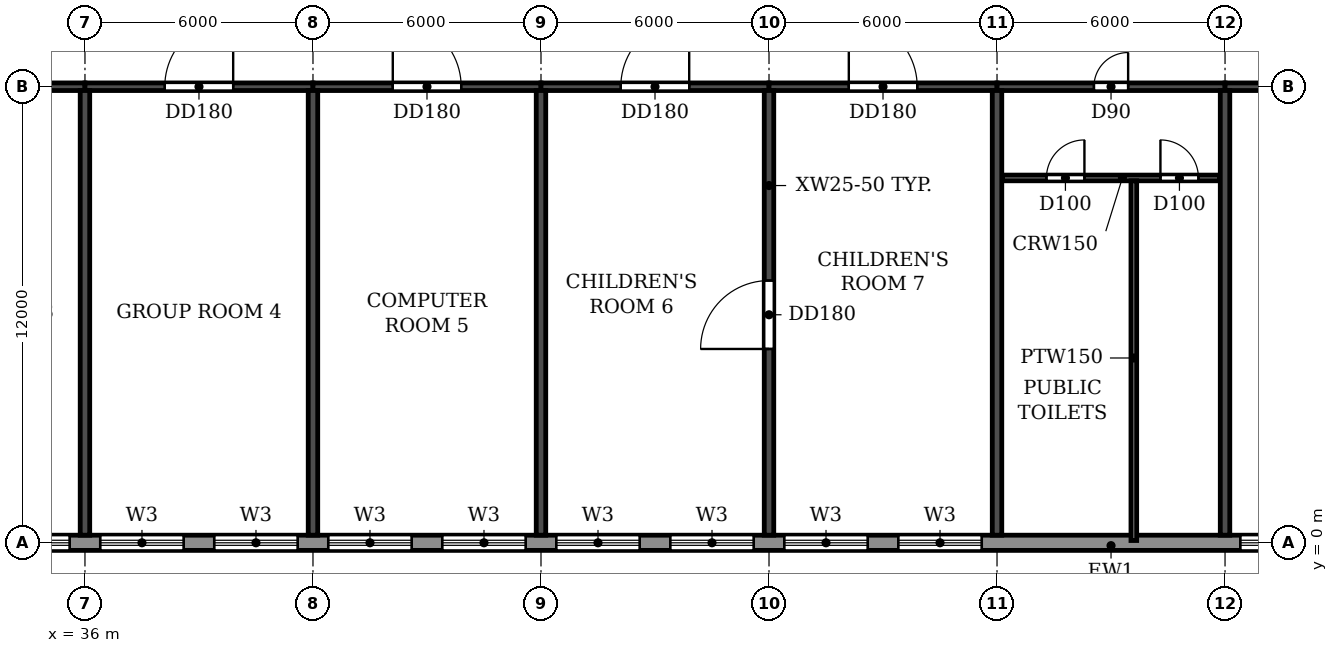
"""IFC4 building model, lengths in metres.
Left out: names, types, materials, properties, quantities, classifications, styles, units other than length and angle.
Written with IfcOpenShell. Run it as: python <this file> out.ifc"""

import sys

from ifc_helpers import new_model, si_unit, direction, frame, frame_2d, origin, place, context, subcontext, project, spatial, rectangle, extrude, element, fill, save


model = new_model("IFC4")
c1 = context("Model", 3, precision=1e-05, world=origin(), true_north=direction((0.0, 1.0)))
c2 = subcontext(c1, "Body", "Model", "MODEL_VIEW")
j1 = project(units=[si_unit("LENGTHUNIT", "METRE"), si_unit("PLANEANGLEUNIT", "RADIAN")], contexts=[c1])
p1 = place(None, origin())
s1 = spatial("IfcSite", under=j1, at=p1, CompositionType="ELEMENT")
p2 = place(p1, origin())
s2 = spatial("IfcBuilding", under=s1, at=p2, CompositionType="ELEMENT")
p3 = place(p2, frame((0.0, 0.0, 211.5)))
s3 = spatial("IfcBuildingStorey", under=s2, at=p3, CompositionType="ELEMENT", Elevation=211.5)
for number, where, z_axis, x_axis in (
    (1, (36.0, 0.2, 0.0), (0.0, 0.0, 1.0), (0.0, 1.0, 0.0)),
    (2, (42.0, 0.2, 0.0), (0.0, 0.0, 1.0), (0.0, 1.0, 0.0)),
    (3, (48.0, 0.2, 0.0), (0.0, 0.0, 1.0), (0.0, 1.0, 0.0)),
):
    element("IfcWall", number, at=place(p3, frame(where, z_axis=z_axis, x_axis=x_axis)), inside=s3, PredefinedType="SHEAR", context=c2, shape_type="SweptSolid", body=[
        extrude(rectangle(XDim=11.7, YDim=0.25, at=frame_2d((5.85, 0.0))), origin(), (0.0, 0.0, 1.0), 2.95),
    ])
p4 = place(p3, frame((54.0, 0.2, 0.0), z_axis=(0.0, 0.0, 1.0), x_axis=(0.0, 1.0, 0.0)))
e4 = element("IfcWall", 4, at=p4, inside=s3, PredefinedType="SHEAR", context=c2, shape_type="SweptSolid", body=[
    extrude(rectangle(XDim=11.7, YDim=0.25, at=frame_2d((5.85, 0.0))), origin(), (0.0, 0.0, 1.0), 2.95),
])
p5 = place(p4, frame((4.9, 0.0, 0.0)))
e5 = element("IfcOpeningElement", 5, at=p5, cuts=e4, PredefinedType="OPENING", context=c2, shape_type="SweptSolid", body=[
    extrude(rectangle(XDim=1.8, YDim=2.1, at=frame_2d((0.9, 1.05))), frame((0.0, 0.135, 0.0), z_axis=(0.0, -1.0, 0.0), x_axis=(1.0, 0.0, 0.0)), (0.0, 0.0, 1.0), 0.27),
])
for number, where, z_axis, x_axis in (
    (6, (60.0, 0.2, 0.0), (0.0, 0.0, 1.0), (0.0, 1.0, 0.0)),
    (7, (66.0, 0.2, 0.0), (0.0, 0.0, 1.0), (0.0, 1.0, 0.0)),
):
    element("IfcWall", number, at=place(p3, frame(where, z_axis=z_axis, x_axis=x_axis)), inside=s3, PredefinedType="SHEAR", context=c2, shape_type="SweptSolid", body=[
        extrude(rectangle(XDim=11.7, YDim=0.25, at=frame_2d((5.85, 0.0))), origin(), (0.0, 0.0, 1.0), 2.95),
    ])
p6 = place(p3, frame((30.0, 12.0, 0.0), z_axis=(0.0, 0.0, 1.0), x_axis=(1.0, 0.0, 0.0)))
e8 = element("IfcWall", 8, at=p6, inside=s3, PredefinedType="SHEAR", context=c2, shape_type="SweptSolid", body=[
    extrude(rectangle(XDim=6.0, YDim=0.2, at=frame_2d((3.0, 0.0))), origin(), (0.0, 0.0, 1.0), 2.35),
])
p7 = place(p6, frame((2.1, 0.0, 0.0)))
e9 = element("IfcOpeningElement", 9, at=p7, cuts=e8, PredefinedType="OPENING", context=c2, shape_type="SweptSolid", body=[
    extrude(rectangle(XDim=1.8, YDim=2.1, at=frame_2d((0.9, 1.05))), frame((0.0, 0.11, 0.0), z_axis=(0.0, -1.0, 0.0), x_axis=(1.0, 0.0, 0.0)), (0.0, 0.0, 1.0), 0.22),
])
p8 = place(p3, frame((36.0, 12.0, 0.0), z_axis=(0.0, 0.0, 1.0), x_axis=(1.0, 0.0, 0.0)))
e10 = element("IfcWall", 10, at=p8, inside=s3, PredefinedType="SHEAR", context=c2, shape_type="SweptSolid", body=[
    extrude(rectangle(XDim=6.0, YDim=0.2, at=frame_2d((3.0, 0.0))), origin(), (0.0, 0.0, 1.0), 2.35),
])
p9 = place(p8, frame((2.1, 0.0, 0.0)))
e11 = element("IfcOpeningElement", 11, at=p9, cuts=e10, PredefinedType="OPENING", context=c2, shape_type="SweptSolid", body=[
    extrude(rectangle(XDim=1.8, YDim=2.1, at=frame_2d((0.9, 1.05))), frame((0.0, 0.11, 0.0), z_axis=(0.0, -1.0, 0.0), x_axis=(1.0, 0.0, 0.0)), (0.0, 0.0, 1.0), 0.22),
])
p10 = place(p3, frame((42.0, 12.0, 0.0), z_axis=(0.0, 0.0, 1.0), x_axis=(1.0, 0.0, 0.0)))
e12 = element("IfcWall", 12, at=p10, inside=s3, PredefinedType="SHEAR", context=c2, shape_type="SweptSolid", body=[
    extrude(rectangle(XDim=6.0, YDim=0.2, at=frame_2d((3.0, 0.0))), origin(), (0.0, 0.0, 1.0), 2.35),
])
p11 = place(p10, frame((2.1, 0.0, 0.0)))
e13 = element("IfcOpeningElement", 13, at=p11, cuts=e12, PredefinedType="OPENING", context=c2, shape_type="SweptSolid", body=[
    extrude(rectangle(XDim=1.8, YDim=2.1, at=frame_2d((0.9, 1.05))), frame((0.0, 0.11, 0.0), z_axis=(0.0, -1.0, 0.0), x_axis=(1.0, 0.0, 0.0)), (0.0, 0.0, 1.0), 0.22),
])
p12 = place(p3, frame((48.0, 12.0, 0.0), z_axis=(0.0, 0.0, 1.0), x_axis=(1.0, 0.0, 0.0)))
e14 = element("IfcWall", 14, at=p12, inside=s3, PredefinedType="SHEAR", context=c2, shape_type="SweptSolid", body=[
    extrude(rectangle(XDim=6.0, YDim=0.2, at=frame_2d((3.0, 0.0))), origin(), (0.0, 0.0, 1.0), 2.35),
])
p13 = place(p12, frame((2.1, 0.0, 0.0)))
e15 = element("IfcOpeningElement", 15, at=p13, cuts=e14, PredefinedType="OPENING", context=c2, shape_type="SweptSolid", body=[
    extrude(rectangle(XDim=1.8, YDim=2.1, at=frame_2d((0.9, 1.05))), frame((0.0, 0.11, 0.0), z_axis=(0.0, -1.0, 0.0), x_axis=(1.0, 0.0, 0.0)), (0.0, 0.0, 1.0), 0.22),
])
p14 = place(p3, frame((54.0, 12.0, 0.0), z_axis=(0.0, 0.0, 1.0), x_axis=(1.0, 0.0, 0.0)))
e16 = element("IfcWall", 16, at=p14, inside=s3, PredefinedType="SHEAR", context=c2, shape_type="SweptSolid", body=[
    extrude(rectangle(XDim=6.0, YDim=0.2, at=frame_2d((3.0, 0.0))), origin(), (0.0, 0.0, 1.0), 2.35),
])
p15 = place(p14, frame((2.1, 0.0, 0.0)))
e17 = element("IfcOpeningElement", 17, at=p15, cuts=e16, PredefinedType="OPENING", context=c2, shape_type="SweptSolid", body=[
    extrude(rectangle(XDim=1.8, YDim=2.1, at=frame_2d((0.9, 1.05))), frame((0.0, 0.11, 0.0), z_axis=(0.0, -1.0, 0.0), x_axis=(1.0, 0.0, 0.0)), (0.0, 0.0, 1.0), 0.22),
])
p16 = place(p3, frame((60.0, 12.0, 0.0), z_axis=(0.0, 0.0, 1.0), x_axis=(1.0, 0.0, 0.0)))
e18 = element("IfcWall", 18, at=p16, inside=s3, PredefinedType="SHEAR", context=c2, shape_type="SweptSolid", body=[
    extrude(rectangle(XDim=6.0, YDim=0.2, at=frame_2d((3.0, 0.0))), origin(), (0.0, 0.0, 1.0), 2.35),
])
p17 = place(p16, frame((2.55, 0.0, 0.0)))
e19 = element("IfcOpeningElement", 19, at=p17, cuts=e18, PredefinedType="OPENING", context=c2, shape_type="SweptSolid", body=[
    extrude(rectangle(XDim=0.9, YDim=2.1, at=frame_2d((0.45, 1.05))), frame((0.0, 0.11, 0.0), z_axis=(0.0, -1.0, 0.0), x_axis=(1.0, 0.0, 0.0)), (0.0, 0.0, 1.0), 0.22),
])
p18 = place(p3, frame((66.0, 12.0, 0.0), z_axis=(0.0, 0.0, 1.0), x_axis=(1.0, 0.0, 0.0)))
e20 = element("IfcWall", 20, at=p18, inside=s3, PredefinedType="SHEAR", context=c2, shape_type="SweptSolid", body=[
    extrude(rectangle(XDim=6.0, YDim=0.2, at=frame_2d((3.0, 0.0))), origin(), (0.0, 0.0, 1.0), 2.35),
])
p19 = place(p18, frame((2.1, 0.0, 0.0)))
e21 = element("IfcOpeningElement", 21, at=p19, cuts=e20, PredefinedType="OPENING", context=c2, shape_type="SweptSolid", body=[
    extrude(rectangle(XDim=1.8, YDim=2.1, at=frame_2d((0.9, 1.05))), frame((0.0, 0.11, 0.0), z_axis=(0.0, -1.0, 0.0), x_axis=(1.0, 0.0, 0.0)), (0.0, 0.0, 1.0), 0.22),
])
p20 = place(p3, frame((22.683, 0.0, 0.0), z_axis=(0.0, 0.0, 1.0), x_axis=(1.0, 0.0, 0.0)))
e22 = element("IfcWall", 22, at=p20, inside=s3, PredefinedType="STANDARD", context=c2, shape_type="SweptSolid", body=[
    extrude(rectangle(XDim=56.634, YDim=0.4, at=frame_2d((28.317, 0.0))), origin(), (0.0, 0.0, 1.0), 2.95),
])
p21 = place(p20, frame((1.717, 0.0, 0.6)))
e23 = element("IfcOpeningElement", 23, at=p21, cuts=e22, PredefinedType="OPENING", context=c2, shape_type="SweptSolid", body=[
    extrude(rectangle(XDim=2.2, YDim=1.8, at=frame_2d((1.1, 0.9))), frame((0.0, 0.21, 0.0), z_axis=(0.0, -1.0, 0.0), x_axis=(1.0, 0.0, 0.0)), (0.0, 0.0, 1.0), 0.42),
])
p22 = place(p20, frame((4.717, 0.0, 0.6)))
e24 = element("IfcOpeningElement", 24, at=p22, cuts=e22, PredefinedType="OPENING", context=c2, shape_type="SweptSolid", body=[
    extrude(rectangle(XDim=2.2, YDim=1.8, at=frame_2d((1.1, 0.9))), frame((0.0, 0.21, 0.0), z_axis=(0.0, -1.0, 0.0), x_axis=(1.0, 0.0, 0.0)), (0.0, 0.0, 1.0), 0.42),
])
p23 = place(p20, frame((7.717, 0.0, 0.6)))
e25 = element("IfcOpeningElement", 25, at=p23, cuts=e22, PredefinedType="OPENING", context=c2, shape_type="SweptSolid", body=[
    extrude(rectangle(XDim=2.2, YDim=1.8, at=frame_2d((1.1, 0.9))), frame((0.0, 0.21, 0.0), z_axis=(0.0, -1.0, 0.0), x_axis=(1.0, 0.0, 0.0)), (0.0, 0.0, 1.0), 0.42),
])
p24 = place(p20, frame((10.717, 0.0, 0.6)))
e26 = element("IfcOpeningElement", 26, at=p24, cuts=e22, PredefinedType="OPENING", context=c2, shape_type="SweptSolid", body=[
    extrude(rectangle(XDim=2.2, YDim=1.8, at=frame_2d((1.1, 0.9))), frame((0.0, 0.21, 0.0), z_axis=(0.0, -1.0, 0.0), x_axis=(1.0, 0.0, 0.0)), (0.0, 0.0, 1.0), 0.42),
])
p25 = place(p20, frame((13.717, 0.0, 0.6)))
e27 = element("IfcOpeningElement", 27, at=p25, cuts=e22, PredefinedType="OPENING", context=c2, shape_type="SweptSolid", body=[
    extrude(rectangle(XDim=2.2, YDim=1.8, at=frame_2d((1.1, 0.9))), frame((0.0, 0.21, 0.0), z_axis=(0.0, -1.0, 0.0), x_axis=(1.0, 0.0, 0.0)), (0.0, 0.0, 1.0), 0.42),
])
p26 = place(p20, frame((16.717, 0.0, 0.6)))
e28 = element("IfcOpeningElement", 28, at=p26, cuts=e22, PredefinedType="OPENING", context=c2, shape_type="SweptSolid", body=[
    extrude(rectangle(XDim=2.2, YDim=1.8, at=frame_2d((1.1, 0.9))), frame((0.0, 0.21, 0.0), z_axis=(0.0, -1.0, 0.0), x_axis=(1.0, 0.0, 0.0)), (0.0, 0.0, 1.0), 0.42),
])
p27 = place(p20, frame((19.717, 0.0, 0.6)))
e29 = element("IfcOpeningElement", 29, at=p27, cuts=e22, PredefinedType="OPENING", context=c2, shape_type="SweptSolid", body=[
    extrude(rectangle(XDim=2.2, YDim=1.8, at=frame_2d((1.1, 0.9))), frame((0.0, 0.21, 0.0), z_axis=(0.0, -1.0, 0.0), x_axis=(1.0, 0.0, 0.0)), (0.0, 0.0, 1.0), 0.42),
])
p28 = place(p20, frame((22.717, 0.0, 0.6)))
e30 = element("IfcOpeningElement", 30, at=p28, cuts=e22, PredefinedType="OPENING", context=c2, shape_type="SweptSolid", body=[
    extrude(rectangle(XDim=2.2, YDim=1.8, at=frame_2d((1.1, 0.9))), frame((0.0, 0.21, 0.0), z_axis=(0.0, -1.0, 0.0), x_axis=(1.0, 0.0, 0.0)), (0.0, 0.0, 1.0), 0.42),
])
p29 = place(p20, frame((25.717, 0.0, 0.6)))
e31 = element("IfcOpeningElement", 31, at=p29, cuts=e22, PredefinedType="OPENING", context=c2, shape_type="SweptSolid", body=[
    extrude(rectangle(XDim=2.2, YDim=1.8, at=frame_2d((1.1, 0.9))), frame((0.0, 0.21, 0.0), z_axis=(0.0, -1.0, 0.0), x_axis=(1.0, 0.0, 0.0)), (0.0, 0.0, 1.0), 0.42),
])
p30 = place(p20, frame((28.717, 0.0, 0.6)))
e32 = element("IfcOpeningElement", 32, at=p30, cuts=e22, PredefinedType="OPENING", context=c2, shape_type="SweptSolid", body=[
    extrude(rectangle(XDim=2.2, YDim=1.8, at=frame_2d((1.1, 0.9))), frame((0.0, 0.21, 0.0), z_axis=(0.0, -1.0, 0.0), x_axis=(1.0, 0.0, 0.0)), (0.0, 0.0, 1.0), 0.42),
])
p31 = place(p20, frame((31.717, 0.0, 0.6)))
e33 = element("IfcOpeningElement", 33, at=p31, cuts=e22, PredefinedType="OPENING", context=c2, shape_type="SweptSolid", body=[
    extrude(rectangle(XDim=2.2, YDim=1.8, at=frame_2d((1.1, 0.9))), frame((0.0, 0.21, 0.0), z_axis=(0.0, -1.0, 0.0), x_axis=(1.0, 0.0, 0.0)), (0.0, 0.0, 1.0), 0.42),
])
p32 = place(p20, frame((34.717, 0.0, 0.6)))
e34 = element("IfcOpeningElement", 34, at=p32, cuts=e22, PredefinedType="OPENING", context=c2, shape_type="SweptSolid", body=[
    extrude(rectangle(XDim=2.2, YDim=1.8, at=frame_2d((1.1, 0.9))), frame((0.0, 0.21, 0.0), z_axis=(0.0, -1.0, 0.0), x_axis=(1.0, 0.0, 0.0)), (0.0, 0.0, 1.0), 0.42),
])
p33 = place(p20, frame((43.717, 0.0, 0.6)))
e35 = element("IfcOpeningElement", 35, at=p33, cuts=e22, PredefinedType="OPENING", context=c2, shape_type="SweptSolid", body=[
    extrude(rectangle(XDim=2.2, YDim=1.8, at=frame_2d((1.1, 0.9))), frame((0.0, 0.21, 0.0), z_axis=(0.0, -1.0, 0.0), x_axis=(1.0, 0.0, 0.0)), (0.0, 0.0, 1.0), 0.42),
])
p34 = place(p20, frame((46.717, 0.0, 0.6)))
e36 = element("IfcOpeningElement", 36, at=p34, cuts=e22, PredefinedType="OPENING", context=c2, shape_type="SweptSolid", body=[
    extrude(rectangle(XDim=2.2, YDim=1.8, at=frame_2d((1.1, 0.9))), frame((0.0, 0.21, 0.0), z_axis=(0.0, -1.0, 0.0), x_axis=(1.0, 0.0, 0.0)), (0.0, 0.0, 1.0), 0.42),
])
p35 = place(p20, frame((49.717, 0.0, 0.6)))
e37 = element("IfcOpeningElement", 37, at=p35, cuts=e22, PredefinedType="OPENING", context=c2, shape_type="SweptSolid", body=[
    extrude(rectangle(XDim=2.2, YDim=1.8, at=frame_2d((1.1, 0.9))), frame((0.0, 0.21, 0.0), z_axis=(0.0, -1.0, 0.0), x_axis=(1.0, 0.0, 0.0)), (0.0, 0.0, 1.0), 0.42),
])
p36 = place(p20, frame((52.717, 0.0, 0.6)))
e38 = element("IfcOpeningElement", 38, at=p36, cuts=e22, PredefinedType="OPENING", context=c2, shape_type="SweptSolid", body=[
    extrude(rectangle(XDim=2.2, YDim=1.8, at=frame_2d((1.1, 0.9))), frame((0.0, 0.21, 0.0), z_axis=(0.0, -1.0, 0.0), x_axis=(1.0, 0.0, 0.0)), (0.0, 0.0, 1.0), 0.42),
])
p37 = place(p3, frame((60.135, 9.6, 0.0), z_axis=(0.0, 0.0, 1.0), x_axis=(1.0, 0.0, 0.0)))
e39 = element("IfcWall", 39, at=p37, inside=s3, PredefinedType="PARTITIONING", context=c2, shape_type="SweptSolid", body=[
    extrude(rectangle(XDim=5.73, YDim=0.15, at=frame_2d((2.865, 0.0))), origin(), (0.0, 0.0, 1.0), 2.95),
])
p38 = place(p37, frame((1.165, 0.0, 0.0)))
e40 = element("IfcOpeningElement", 40, at=p38, cuts=e39, PredefinedType="OPENING", context=c2, shape_type="SweptSolid", body=[
    extrude(rectangle(XDim=1.0, YDim=2.1, at=frame_2d((0.5, 1.05))), frame((0.0, 0.085, 0.0), z_axis=(0.0, -1.0, 0.0), x_axis=(1.0, 0.0, 0.0)), (0.0, 0.0, 1.0), 0.17),
])
p39 = place(p37, frame((4.165, 0.0, 0.0)))
e41 = element("IfcOpeningElement", 41, at=p39, cuts=e39, PredefinedType="OPENING", context=c2, shape_type="SweptSolid", body=[
    extrude(rectangle(XDim=1.0, YDim=2.1, at=frame_2d((0.5, 1.05))), frame((0.0, 0.085, 0.0), z_axis=(0.0, -1.0, 0.0), x_axis=(1.0, 0.0, 0.0)), (0.0, 0.0, 1.0), 0.17),
])
p40 = place(p3, frame((63.6, 0.06, 0.0), z_axis=(0.0, 0.0, 1.0), x_axis=(0.0, 1.0, 0.0)))
e42 = element("IfcWall", 42, at=p40, inside=s3, PredefinedType="PARTITIONING", context=c2, shape_type="SweptSolid", body=[
    extrude(rectangle(XDim=9.465, YDim=0.15, at=frame_2d((4.732, 0.0))), origin(), (0.0, 0.0, 1.0), 2.95),
])
p41 = place(p24, origin())
e43 = element("IfcWindow", 43, at=p41, inside=s3, PartitioningType="DOUBLE_PANEL_HORIZONTAL", PredefinedType="WINDOW", context=c2, shape_type="SweptSolid", body=[
    extrude(rectangle(XDim=2.2, YDim=1.8, at=frame_2d((1.1, 0.9))), frame((0.0, 0.03, 0.0), z_axis=(0.0, -1.0, 0.0), x_axis=(1.0, 0.0, 0.0)), (0.0, 0.0, 1.0), 0.06),
])
fill(e26, e43)
p42 = place(p25, origin())
e44 = element("IfcWindow", 44, at=p42, inside=s3, PartitioningType="DOUBLE_PANEL_HORIZONTAL", PredefinedType="WINDOW", context=c2, shape_type="SweptSolid", body=[
    extrude(rectangle(XDim=2.2, YDim=1.8, at=frame_2d((1.1, 0.9))), frame((0.0, 0.03, 0.0), z_axis=(0.0, -1.0, 0.0), x_axis=(1.0, 0.0, 0.0)), (0.0, 0.0, 1.0), 0.06),
])
fill(e27, e44)
p43 = place(p26, origin())
e45 = element("IfcWindow", 45, at=p43, inside=s3, PartitioningType="DOUBLE_PANEL_HORIZONTAL", PredefinedType="WINDOW", context=c2, shape_type="SweptSolid", body=[
    extrude(rectangle(XDim=2.2, YDim=1.8, at=frame_2d((1.1, 0.9))), frame((0.0, 0.03, 0.0), z_axis=(0.0, -1.0, 0.0), x_axis=(1.0, 0.0, 0.0)), (0.0, 0.0, 1.0), 0.06),
])
fill(e28, e45)
p44 = place(p27, origin())
e46 = element("IfcWindow", 46, at=p44, inside=s3, PartitioningType="DOUBLE_PANEL_HORIZONTAL", PredefinedType="WINDOW", context=c2, shape_type="SweptSolid", body=[
    extrude(rectangle(XDim=2.2, YDim=1.8, at=frame_2d((1.1, 0.9))), frame((0.0, 0.03, 0.0), z_axis=(0.0, -1.0, 0.0), x_axis=(1.0, 0.0, 0.0)), (0.0, 0.0, 1.0), 0.06),
])
fill(e29, e46)
p45 = place(p28, origin())
e47 = element("IfcWindow", 47, at=p45, inside=s3, PartitioningType="DOUBLE_PANEL_HORIZONTAL", PredefinedType="WINDOW", context=c2, shape_type="SweptSolid", body=[
    extrude(rectangle(XDim=2.2, YDim=1.8, at=frame_2d((1.1, 0.9))), frame((0.0, 0.03, 0.0), z_axis=(0.0, -1.0, 0.0), x_axis=(1.0, 0.0, 0.0)), (0.0, 0.0, 1.0), 0.06),
])
fill(e30, e47)
p46 = place(p29, origin())
e48 = element("IfcWindow", 48, at=p46, inside=s3, PartitioningType="DOUBLE_PANEL_HORIZONTAL", PredefinedType="WINDOW", context=c2, shape_type="SweptSolid", body=[
    extrude(rectangle(XDim=2.2, YDim=1.8, at=frame_2d((1.1, 0.9))), frame((0.0, 0.03, 0.0), z_axis=(0.0, -1.0, 0.0), x_axis=(1.0, 0.0, 0.0)), (0.0, 0.0, 1.0), 0.06),
])
fill(e31, e48)
p47 = place(p30, origin())
e49 = element("IfcWindow", 49, at=p47, inside=s3, PartitioningType="DOUBLE_PANEL_HORIZONTAL", PredefinedType="WINDOW", context=c2, shape_type="SweptSolid", body=[
    extrude(rectangle(XDim=2.2, YDim=1.8, at=frame_2d((1.1, 0.9))), frame((0.0, 0.03, 0.0), z_axis=(0.0, -1.0, 0.0), x_axis=(1.0, 0.0, 0.0)), (0.0, 0.0, 1.0), 0.06),
])
fill(e32, e49)
p48 = place(p31, origin())
e50 = element("IfcWindow", 50, at=p48, inside=s3, PartitioningType="DOUBLE_PANEL_HORIZONTAL", PredefinedType="WINDOW", context=c2, shape_type="SweptSolid", body=[
    extrude(rectangle(XDim=2.2, YDim=1.8, at=frame_2d((1.1, 0.9))), frame((0.0, 0.03, 0.0), z_axis=(0.0, -1.0, 0.0), x_axis=(1.0, 0.0, 0.0)), (0.0, 0.0, 1.0), 0.06),
])
fill(e33, e50)
p49 = place(p32, origin())
e51 = element("IfcWindow", 51, at=p49, inside=s3, PartitioningType="DOUBLE_PANEL_HORIZONTAL", PredefinedType="WINDOW", context=c2, shape_type="SweptSolid", body=[
    extrude(rectangle(XDim=2.2, YDim=1.8, at=frame_2d((1.1, 0.9))), frame((0.0, 0.03, 0.0), z_axis=(0.0, -1.0, 0.0), x_axis=(1.0, 0.0, 0.0)), (0.0, 0.0, 1.0), 0.06),
])
fill(e34, e51)
p50 = place(p33, origin())
e52 = element("IfcWindow", 52, at=p50, inside=s3, PartitioningType="DOUBLE_PANEL_HORIZONTAL", PredefinedType="WINDOW", context=c2, shape_type="SweptSolid", body=[
    extrude(rectangle(XDim=2.2, YDim=1.8, at=frame_2d((1.1, 0.9))), frame((0.0, 0.03, 0.0), z_axis=(0.0, -1.0, 0.0), x_axis=(1.0, 0.0, 0.0)), (0.0, 0.0, 1.0), 0.06),
])
fill(e35, e52)
p51 = place(p9, origin())
e53 = element("IfcDoor", 53, at=p51, inside=s3, OperationType="DOUBLE_DOOR_SINGLE_SWING", PredefinedType="DOOR", context=c2, shape_type="SweptSolid", body=[
    extrude(rectangle(XDim=1.8, YDim=2.1, at=frame_2d((0.9, 1.05))), frame((0.0, 0.025, 0.0), z_axis=(0.0, -1.0, 0.0), x_axis=(1.0, 0.0, 0.0)), (0.0, 0.0, 1.0), 0.05),
])
fill(e11, e53)
p52 = place(p11, origin())
e54 = element("IfcDoor", 54, at=p52, inside=s3, OperationType="DOUBLE_DOOR_SINGLE_SWING", PredefinedType="DOOR", context=c2, shape_type="SweptSolid", body=[
    extrude(rectangle(XDim=1.8, YDim=2.1, at=frame_2d((0.9, 1.05))), frame((0.0, 0.025, 0.0), z_axis=(0.0, -1.0, 0.0), x_axis=(1.0, 0.0, 0.0)), (0.0, 0.0, 1.0), 0.05),
])
fill(e13, e54)
p53 = place(p13, origin())
e55 = element("IfcDoor", 55, at=p53, inside=s3, OperationType="DOUBLE_DOOR_SINGLE_SWING", PredefinedType="DOOR", context=c2, shape_type="SweptSolid", body=[
    extrude(rectangle(XDim=1.8, YDim=2.1, at=frame_2d((0.9, 1.05))), frame((0.0, 0.025, 0.0), z_axis=(0.0, -1.0, 0.0), x_axis=(1.0, 0.0, 0.0)), (0.0, 0.0, 1.0), 0.05),
])
fill(e15, e55)
p54 = place(p15, origin())
e56 = element("IfcDoor", 56, at=p54, inside=s3, OperationType="DOUBLE_DOOR_SINGLE_SWING", PredefinedType="DOOR", context=c2, shape_type="SweptSolid", body=[
    extrude(rectangle(XDim=1.8, YDim=2.1, at=frame_2d((0.9, 1.05))), frame((0.0, 0.025, 0.0), z_axis=(0.0, -1.0, 0.0), x_axis=(1.0, 0.0, 0.0)), (0.0, 0.0, 1.0), 0.05),
])
fill(e17, e56)
p55 = place(p17, origin())
e57 = element("IfcDoor", 57, at=p55, inside=s3, OperationType="SINGLE_SWING_RIGHT", PredefinedType="DOOR", context=c2, shape_type="SweptSolid", body=[
    extrude(rectangle(XDim=0.9, YDim=2.1, at=frame_2d((0.45, 1.05))), frame((0.0, 0.025, 0.0), z_axis=(0.0, -1.0, 0.0), x_axis=(1.0, 0.0, 0.0)), (0.0, 0.0, 1.0), 0.05),
])
fill(e19, e57)
p56 = place(p5, origin())
e58 = element("IfcDoor", 58, at=p56, inside=s3, OperationType="DOUBLE_DOOR_SINGLE_SWING", PredefinedType="DOOR", context=c2, shape_type="SweptSolid", body=[
    extrude(rectangle(XDim=1.8, YDim=2.1, at=frame_2d((0.9, 1.05))), frame((0.0, 0.025, 0.0), z_axis=(0.0, -1.0, 0.0), x_axis=(1.0, 0.0, 0.0)), (0.0, 0.0, 1.0), 0.05),
])
fill(e5, e58)
p57 = place(p38, origin())
e59 = element("IfcDoor", 59, at=p57, inside=s3, OperationType="SINGLE_SWING_RIGHT", PredefinedType="DOOR", context=c2, shape_type="SweptSolid", body=[
    extrude(rectangle(XDim=1.0, YDim=2.1, at=frame_2d((0.5, 1.05))), frame((0.0, 0.025, 0.0), z_axis=(0.0, -1.0, 0.0), x_axis=(1.0, 0.0, 0.0)), (0.0, 0.0, 1.0), 0.05),
])
fill(e40, e59)
p58 = place(p39, origin())
e60 = element("IfcDoor", 60, at=p58, inside=s3, OperationType="SINGLE_SWING_LEFT", PredefinedType="DOOR", context=c2, shape_type="SweptSolid", body=[
    extrude(rectangle(XDim=1.0, YDim=2.1, at=frame_2d((0.5, 1.05))), frame((0.0, 0.025, 0.0), z_axis=(0.0, -1.0, 0.0), x_axis=(1.0, 0.0, 0.0)), (0.0, 0.0, 1.0), 0.05),
])
fill(e41, e60)
save(model, sys.argv[1])
